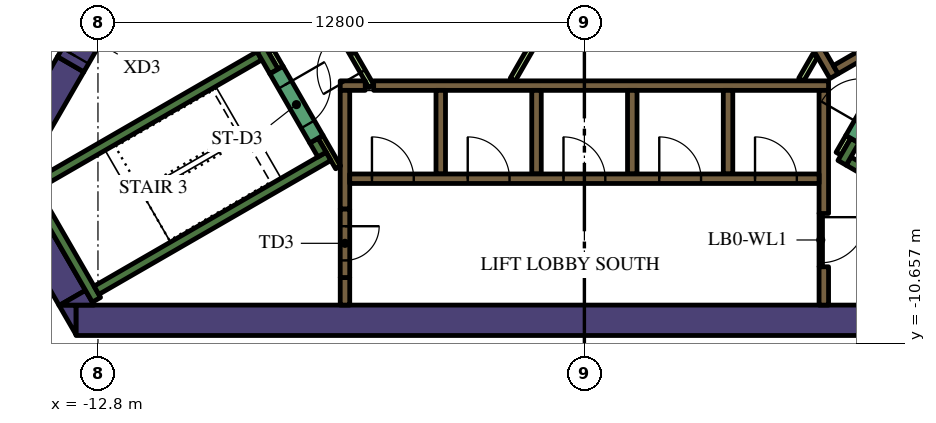
"""IFC4 building model, lengths in metres.
Left out: names, types, materials, properties, quantities, classifications, styles, units other than length and angle.
Written with IfcOpenShell. Run it as: python <this file> out.ifc"""

import sys

from ifc_helpers import new_model, si_unit, direction, frame, frame_2d, origin, place, context, subcontext, project, spatial, polyline, rectangle, outline, extrude, element, fill, save


model = new_model("IFC4")
c1 = context("Model", 3, precision=1e-05, world=origin(), true_north=direction((0.0, 1.0)))
c2 = subcontext(c1, "Body", "Model", "MODEL_VIEW")
j1 = project(units=[si_unit("LENGTHUNIT", "METRE"), si_unit("PLANEANGLEUNIT", "RADIAN")], contexts=[c1])
p1 = place(None, origin())
s1 = spatial("IfcSite", under=j1, at=p1, CompositionType="ELEMENT")
p2 = place(p1, origin())
s2 = spatial("IfcBuilding", under=s1, at=p2, CompositionType="ELEMENT")
p3 = place(p2, frame((0.0, 0.0, 162.6)))
s3 = spatial("IfcBuildingStorey", under=s2, at=p3, CompositionType="ELEMENT", Elevation=162.6)
p4 = place(p3, frame((-13.378, -10.05, 0.0), z_axis=(0.0, 0.0, 1.0), x_axis=(1.0, 0.0, 0.0)))
e1 = element("IfcWall", 1, at=p4, inside=s3, PredefinedType="SOLIDWALL", context=c2, shape_type="SweptSolid", body=[
    extrude(rectangle(XDim=22.282, YDim=0.8, at=frame_2d((11.141, 0.0))), origin(), (0.0, 0.0, 1.0), 4.2),
])
p5 = place(p3, origin())
e2 = element("IfcWall", 2, at=p5, inside=s3, PredefinedType="SOLIDWALL", context=c2, shape_type="SweptSolid", body=[
    extrude(outline(polyline([(-13.828, -9.65), (-13.38, -9.65), (-13.38, -10.426), (-13.828, -9.65)])), origin(), (0.0, 0.0, 1.0), 4.2),
])
p6 = place(p3, frame((-15.387, -6.148, 0.0), z_axis=(0.0, 0.0, 1.0), x_axis=(0.499984020225, -0.866034629516, 0.0)))
e3 = element("IfcWall", 3, at=p6, inside=s3, PredefinedType="SOLIDWALL", context=c2, shape_type="SweptSolid", body=[
    extrude(rectangle(XDim=3.824, YDim=0.8, at=frame_2d((1.912, 0.0))), origin(), (0.0, 0.0, 1.0), 4.2),
])
e4 = element("IfcWall", 4, at=p5, inside=s3, PredefinedType="SOLIDWALL", context=c2, shape_type="SweptSolid", body=[
    extrude(outline(polyline([(-12.904, -9.65), (-13.8, -9.65), (-13.128, -9.262), (-12.904, -9.65)])), origin(), (0.0, 0.0, 1.0), 4.2),
])
p7 = place(p3, frame((-13.518, -3.314, 0.0), z_axis=(0.0, 0.0, 1.0), x_axis=(-0.499969377405, -0.866043083026, 0.0)))
e5 = element("IfcWall", 5, at=p7, inside=s3, PredefinedType="SOLIDWALL", context=c2, shape_type="SweptSolid", body=[
    extrude(rectangle(XDim=2.824, YDim=0.8, at=frame_2d((1.412, 0.0))), origin(), (0.0, 0.0, 1.0), 4.2),
])
p8 = place(p3, frame((12.84, -9.261, 0.0), z_axis=(0.0, 0.0, 1.0), x_axis=(-0.866013990052, 0.500019768644, 0.0)))
e6 = element("IfcWall", 6, at=p8, inside=s3, PredefinedType="SOLIDWALL", context=c2, shape_type="SweptSolid", body=[
    extrude(rectangle(XDim=6.8, YDim=0.25, at=frame_2d((3.4, 0.0))), origin(), (0.0, 0.0, 1.0), 4.2),
])
p9 = place(p3, frame((6.78, -5.906, 0.0), z_axis=(0.0, 0.0, 1.0), x_axis=(0.500223362819, 0.865896406789, 0.0)))
e7 = element("IfcWall", 7, at=p9, inside=s3, PredefinedType="SOLIDWALL", context=c2, shape_type="SweptSolid", body=[
    extrude(rectangle(XDim=0.675, YDim=0.25, at=frame_2d((0.337, 0.0))), origin(), (0.0, 0.0, 1.0), 4.2),
])
p10 = place(p3, frame((-12.84, -9.511, 0.0), z_axis=(0.0, 0.0, 1.0), x_axis=(-0.499997733992, 0.866026712061, 0.0)))
e8 = element("IfcWall", 8, at=p10, inside=s3, PredefinedType="SOLIDWALL", context=c2, shape_type="SweptSolid", body=[
    extrude(rectangle(XDim=3.634, YDim=0.25, at=frame_2d((1.817, 0.0))), origin(), (0.0, 0.0, 1.0), 4.2),
])
p11 = place(p3, frame((-14.44, -6.49, 0.0), z_axis=(0.0, 0.0, 1.0), x_axis=(0.866022966069, 0.500004222222, 0.0)))
e9 = element("IfcWall", 9, at=p11, inside=s3, PredefinedType="SOLIDWALL", context=c2, shape_type="SweptSolid", body=[
    extrude(rectangle(XDim=6.8, YDim=0.25, at=frame_2d((3.4, 0.0))), origin(), (0.0, 0.0, 1.0), 4.2),
])
p12 = place(p3, frame((-8.168, -3.503, 0.0), z_axis=(0.0, 0.0, 1.0), x_axis=(-0.499952099219, 0.866053057547, 0.0)))
e10 = element("IfcWall", 10, at=p12, inside=s3, PredefinedType="SOLIDWALL", context=c2, shape_type="SweptSolid", body=[
    extrude(rectangle(XDim=0.675, YDim=0.25, at=frame_2d((0.337, 0.0))), origin(), (0.0, 0.0, 1.0), 4.2),
])
p13 = place(p3, frame((-12.84, -9.261, 0.0), z_axis=(0.0, 0.0, 1.0), x_axis=(0.866016039709, 0.500016218704, 0.0)))
e11 = element("IfcWall", 11, at=p13, inside=s3, PredefinedType="SOLIDWALL", context=c2, shape_type="SweptSolid", body=[
    extrude(rectangle(XDim=7.05, YDim=0.25, at=frame_2d((3.525, 0.0))), origin(), (0.0, 0.0, 1.0), 4.2),
])
p14 = place(p3, frame((-6.905, -5.69, 0.0), z_axis=(0.0, 0.0, 1.0), x_axis=(-0.500402024738, 0.865793170242, 0.0)))
e12 = element("IfcWall", 12, at=p14, inside=s3, PredefinedType="SOLIDWALL", context=c2, shape_type="SweptSolid", body=[
    extrude(rectangle(XDim=0.425, YDim=0.25, at=frame_2d((0.212, 0.0))), origin(), (0.0, 0.0, 1.0), 4.2),
])
p15 = place(p3, frame((-6.3, -8.925, 0.0), z_axis=(0.0, 0.0, 1.0), x_axis=(0.0, -1.0, 0.0)))
e13 = element("IfcWall", 13, at=p15, inside=s3, PredefinedType="SOLIDWALL", context=c2, shape_type="SweptSolid", body=[
    extrude(rectangle(XDim=0.725, YDim=0.25, at=frame_2d((0.363, 0.0))), origin(), (0.0, 0.0, 1.0), 4.2),
])
p16 = place(p3, frame((-5.545, -3.875, 0.0), z_axis=(0.0, 0.0, 1.0), x_axis=(1.0, 0.0, 0.0)))
e14 = element("IfcWall", 14, at=p16, inside=s3, PredefinedType="SOLIDWALL", context=c2, shape_type="SweptSolid", body=[
    extrude(rectangle(XDim=11.97, YDim=0.25, at=frame_2d((5.985, 0.0))), origin(), (0.0, 0.0, 1.0), 4.2),
])
p17 = place(p3, frame((-6.425, -3.875, 0.0), z_axis=(0.0, 0.0, 1.0), x_axis=(1.0, 0.0, 0.0)))
e15 = element("IfcWall", 15, at=p17, inside=s3, PredefinedType="SOLIDWALL", context=c2, shape_type="SweptSolid", body=[
    extrude(rectangle(XDim=0.658, YDim=0.25, at=frame_2d((0.329, 0.0))), origin(), (0.0, 0.0, 1.0), 4.2),
])
p18 = place(p3, frame((6.3, -7.24, 0.0), z_axis=(0.0, 0.0, 1.0), x_axis=(0.0, 1.0, 0.0)))
e16 = element("IfcWall", 16, at=p18, inside=s3, PredefinedType="SOLIDWALL", context=c2, shape_type="SweptSolid", body=[
    extrude(rectangle(XDim=3.24, YDim=0.25, at=frame_2d((1.62, 0.0))), origin(), (0.0, 0.0, 1.0), 4.2),
])
p19 = place(p3, frame((6.3, -9.65, 0.0), z_axis=(0.0, 0.0, 1.0), x_axis=(0.0, 1.0, 0.0)))
e17 = element("IfcWall", 17, at=p19, inside=s3, PredefinedType="SOLIDWALL", context=c2, shape_type="SweptSolid", body=[
    extrude(rectangle(XDim=1.008, YDim=0.25, at=frame_2d((0.504, 0.0))), origin(), (0.0, 0.0, 1.0), 4.2),
])
for number, where, z_axis, x_axis in (
    (18, (3.78, -4.0, 0.0), (0.0, 0.0, 1.0), (0.0, -1.0, 0.0)),
    (19, (1.26, -4.0, 0.0), (0.0, 0.0, 1.0), (0.0, -1.0, 0.0)),
    (20, (-1.26, -4.0, 0.0), (0.0, 0.0, 1.0), (0.0, -1.0, 0.0)),
    (21, (-3.78, -4.0, 0.0), (0.0, 0.0, 1.0), (0.0, -1.0, 0.0)),
):
    element("IfcWall", number, at=place(p3, frame(where, z_axis=z_axis, x_axis=x_axis)), inside=s3, PredefinedType="SOLIDWALL", context=c2, shape_type="SweptSolid", body=[
        extrude(rectangle(XDim=2.2, YDim=0.25, at=frame_2d((1.1, 0.0))), origin(), (0.0, 0.0, 1.0), 4.2),
    ])
p20 = place(p3, frame((-6.3, -7.125, 0.0), z_axis=(0.0, 0.0, 1.0), x_axis=(0.0, 1.0, 0.0)))
e22 = element("IfcWall", 22, at=p20, inside=s3, PredefinedType="SOLIDWALL", context=c2, shape_type="SweptSolid", body=[
    extrude(rectangle(XDim=3.125, YDim=0.25, at=frame_2d((1.562, 0.0))), origin(), (0.0, 0.0, 1.0), 4.2),
])
p21 = place(p3, frame((6.568, -3.627, 0.0), z_axis=(0.0, 0.0, 1.0), x_axis=(-0.499999455981, 0.866025717874, 0.0)))
e23 = element("IfcWall", 23, at=p21, inside=s3, PredefinedType="SOLIDWALL", context=c2, shape_type="SweptSolid", body=[
    extrude(rectangle(XDim=11.978, YDim=0.25, at=frame_2d((5.989, 0.0))), origin(), (0.0, 0.0, 1.0), 4.2),
])
p22 = place(p3, frame((6.614, -3.456, 0.0), z_axis=(0.0, 0.0, 1.0), x_axis=(0.866032512851, 0.499987686533, 0.0)))
e24 = element("IfcWall", 24, at=p22, inside=s3, PredefinedType="SOLIDWALL", context=c2, shape_type="SweptSolid", body=[
    extrude(rectangle(XDim=2.975, YDim=0.25, at=frame_2d((1.487, 0.0))), origin(), (0.0, 0.0, 1.0), 4.2),
])
p23 = place(p3, frame((-8.252, -2.958, 0.0), z_axis=(0.0, 0.0, 1.0), x_axis=(0.500174715838, -0.865924508047, 0.0)))
e25 = element("IfcWall", 25, at=p23, inside=s3, PredefinedType="PARTITIONING", context=c2, shape_type="SweptSolid", body=[
    extrude(rectangle(XDim=0.514, YDim=0.15, at=frame_2d((0.257, 0.0))), origin(), (0.0, 0.0, 1.0), 3.15),
])
p24 = place(p3, frame((-6.48, -6.027, 0.0), z_axis=(0.0, 0.0, 1.0), x_axis=(-0.499927229454, 0.866067413802, 0.0)))
e26 = element("IfcWall", 26, at=p24, inside=s3, PredefinedType="PARTITIONING", context=c2, shape_type="SweptSolid", body=[
    extrude(rectangle(XDim=0.929, YDim=0.15, at=frame_2d((0.464, 0.0))), origin(), (0.0, 0.0, 1.0), 4.2),
])
p25 = place(p3, frame((6.945, -5.222, 0.0), z_axis=(0.0, 0.0, 1.0), x_axis=(-0.499818422106, -0.866130212453, 0.0)))
e27 = element("IfcWall", 27, at=p25, inside=s3, PredefinedType="PARTITIONING", context=c2, shape_type="SweptSolid", body=[
    extrude(rectangle(XDim=0.514, YDim=0.15, at=frame_2d((0.257, 0.0))), origin(), (0.0, 0.0, 1.0), 3.15),
])
p26 = place(p3, frame((5.705, -3.718, 0.0), z_axis=(0.0, 0.0, 1.0), x_axis=(0.499962090823, 0.866047289552, 0.0)))
e28 = element("IfcWall", 28, at=p26, inside=s3, PredefinedType="PARTITIONING", context=c2, shape_type="SweptSolid", body=[
    extrude(rectangle(XDim=0.735, YDim=0.15, at=frame_2d((0.367, 0.0))), origin(), (0.0, 0.0, 1.0), 3.15),
])
p27 = place(p3, frame((-1.887, -3.718, 0.0), z_axis=(0.0, 0.0, 1.0), x_axis=(0.500043732237, 0.866000153493, 0.0)))
e29 = element("IfcWall", 29, at=p27, inside=s3, PredefinedType="PARTITIONING", context=c2, shape_type="SweptSolid", body=[
    extrude(rectangle(XDim=3.114, YDim=0.15, at=frame_2d((1.557, 0.0))), origin(), (0.0, 0.0, 1.0), 3.15),
])
p28 = place(p3, frame((-6.175, -6.325, 0.0), z_axis=(0.0, 0.0, 1.0), x_axis=(1.0, 0.0, 0.0)))
e30 = element("IfcWall", 30, at=p28, inside=s3, PredefinedType="SOLIDWALL", context=c2, shape_type="SweptSolid", body=[
    extrude(rectangle(XDim=12.35, YDim=0.25, at=frame_2d((6.175, 0.0))), origin(), (0.0, 0.0, 1.0), 4.2),
])
p29 = place(p28, frame((0.585, 0.0, 0.0)))
e31 = element("IfcOpeningElement", 31, at=p29, cuts=e30, PredefinedType="OPENING", context=c2, shape_type="SweptSolid", body=[
    extrude(rectangle(XDim=1.1, YDim=2.1, at=frame_2d((0.55, 1.05))), frame((0.0, 0.135, 0.0), z_axis=(0.0, -1.0, 0.0), x_axis=(1.0, 0.0, 0.0)), (0.0, 0.0, 1.0), 0.27),
])
p30 = place(p28, frame((3.105, 0.0, 0.0)))
e32 = element("IfcOpeningElement", 32, at=p30, cuts=e30, PredefinedType="OPENING", context=c2, shape_type="SweptSolid", body=[
    extrude(rectangle(XDim=1.1, YDim=2.1, at=frame_2d((0.55, 1.05))), frame((0.0, 0.135, 0.0), z_axis=(0.0, -1.0, 0.0), x_axis=(1.0, 0.0, 0.0)), (0.0, 0.0, 1.0), 0.27),
])
p31 = place(p28, frame((5.625, 0.0, 0.0)))
e33 = element("IfcOpeningElement", 33, at=p31, cuts=e30, PredefinedType="OPENING", context=c2, shape_type="SweptSolid", body=[
    extrude(rectangle(XDim=1.1, YDim=2.1, at=frame_2d((0.55, 1.05))), frame((0.0, 0.135, 0.0), z_axis=(0.0, -1.0, 0.0), x_axis=(1.0, 0.0, 0.0)), (0.0, 0.0, 1.0), 0.27),
])
p32 = place(p28, frame((8.145, 0.0, 0.0)))
e34 = element("IfcOpeningElement", 34, at=p32, cuts=e30, PredefinedType="OPENING", context=c2, shape_type="SweptSolid", body=[
    extrude(rectangle(XDim=1.1, YDim=2.1, at=frame_2d((0.55, 1.05))), frame((0.0, 0.135, 0.0), z_axis=(0.0, -1.0, 0.0), x_axis=(1.0, 0.0, 0.0)), (0.0, 0.0, 1.0), 0.27),
])
p33 = place(p28, frame((10.665, 0.0, 0.0)))
e35 = element("IfcOpeningElement", 35, at=p33, cuts=e30, PredefinedType="OPENING", context=c2, shape_type="SweptSolid", body=[
    extrude(rectangle(XDim=1.1, YDim=2.1, at=frame_2d((0.55, 1.05))), frame((0.0, 0.135, 0.0), z_axis=(0.0, -1.0, 0.0), x_axis=(1.0, 0.0, 0.0)), (0.0, 0.0, 1.0), 0.27),
])
p34 = place(p3, frame((7.053, -5.284, 0.0), z_axis=(0.0, 0.0, 1.0), x_axis=(0.500078061341, 0.865980330357, 0.0)))
e36 = element("IfcWall", 36, at=p34, inside=s3, PredefinedType="SOLIDWALL", context=c2, shape_type="SweptSolid", body=[
    extrude(rectangle(XDim=2.1, YDim=0.4, at=frame_2d((1.05, 0.0))), origin(), (0.0, 0.0, 1.0), 4.2),
])
p35 = place(p34, frame((0.45, 0.0, 0.0)))
e37 = element("IfcOpeningElement", 37, at=p35, cuts=e36, PredefinedType="OPENING", context=c2, shape_type="SweptSolid", body=[
    extrude(rectangle(XDim=1.2, YDim=2.1, at=frame_2d((0.6, 1.05))), frame((0.0, 0.21, 0.0), z_axis=(0.0, -1.0, 0.0), x_axis=(1.0, 0.0, 0.0)), (0.0, 0.0, 1.0), 0.42),
])
p36 = place(p3, frame((-8.103, -3.466, 0.0), z_axis=(0.0, 0.0, 1.0), x_axis=(0.500078061341, -0.865980330357, 0.0)))
e38 = element("IfcWall", 38, at=p36, inside=s3, PredefinedType="SOLIDWALL", context=c2, shape_type="SweptSolid", body=[
    extrude(rectangle(XDim=2.1, YDim=0.4, at=frame_2d((1.05, 0.0))), origin(), (0.0, 0.0, 1.0), 4.2),
])
p37 = place(p36, frame((0.45, 0.0, 0.0)))
e39 = element("IfcOpeningElement", 39, at=p37, cuts=e38, PredefinedType="OPENING", context=c2, shape_type="SweptSolid", body=[
    extrude(rectangle(XDim=1.2, YDim=2.1, at=frame_2d((0.6, 1.05))), frame((0.0, 0.21, 0.0), z_axis=(0.0, -1.0, 0.0), x_axis=(1.0, 0.0, 0.0)), (0.0, 0.0, 1.0), 0.42),
])
p38 = place(p3, frame((-6.3, -7.125, 0.0), z_axis=(0.0, 0.0, 1.0), x_axis=(0.0, -1.0, 0.0)))
e40 = element("IfcWall", 40, at=p38, inside=s3, PredefinedType="SOLIDWALL", context=c2, shape_type="SweptSolid", body=[
    extrude(rectangle(XDim=1.8, YDim=0.25, at=frame_2d((0.9, 0.0))), origin(), (0.0, 0.0, 1.0), 4.2),
])
p39 = place(p38, frame((0.45, 0.0, 0.0)))
e41 = element("IfcOpeningElement", 41, at=p39, cuts=e40, PredefinedType="OPENING", context=c2, shape_type="SweptSolid", body=[
    extrude(rectangle(XDim=0.9, YDim=2.1, at=frame_2d((0.45, 1.05))), frame((0.0, 0.135, 0.0), z_axis=(0.0, -1.0, 0.0), x_axis=(1.0, 0.0, 0.0)), (0.0, 0.0, 1.0), 0.27),
])
p40 = place(p3, frame((-5.606, -3.89, 0.0), z_axis=(0.0, 0.0, 1.0), x_axis=(-0.500027713859, 0.866009402589, 0.0)))
e42 = element("IfcWall", 42, at=p40, inside=s3, PredefinedType="PARTITIONING", context=c2, shape_type="SweptSolid", body=[
    extrude(rectangle(XDim=2.1, YDim=0.15, at=frame_2d((1.05, 0.0))), origin(), (0.0, 0.0, 1.0), 3.15),
])
p41 = place(p40, frame((0.45, 0.0, 0.0)))
e43 = element("IfcOpeningElement", 43, at=p41, cuts=e42, PredefinedType="OPENING", context=c2, shape_type="SweptSolid", body=[
    extrude(rectangle(XDim=1.2, YDim=2.1, at=frame_2d((0.6, 1.05))), frame((0.0, 0.085, 0.0), z_axis=(0.0, -1.0, 0.0), x_axis=(1.0, 0.0, 0.0)), (0.0, 0.0, 1.0), 0.17),
])
p42 = place(p3, frame((6.22, -7.237, 0.0), z_axis=(0.0, 0.0, 1.0), x_axis=(0.0, -1.0, 0.0)))
e44 = element("IfcWall", 44, at=p42, inside=s3, PredefinedType="PARTITIONING", context=c2, shape_type="SweptSolid", body=[
    extrude(rectangle(XDim=1.4, YDim=0.09, at=frame_2d((0.7, 0.0))), origin(), (0.0, 0.0, 1.0), 3.15),
])
p43 = place(p42, frame((0.1, 0.0, 0.0)))
e45 = element("IfcOpeningElement", 45, at=p43, cuts=e44, PredefinedType="OPENING", context=c2, shape_type="SweptSolid", body=[
    extrude(rectangle(XDim=1.2, YDim=2.1, at=frame_2d((0.6, 1.05))), frame((0.0, 0.055, 0.0), z_axis=(0.0, -1.0, 0.0), x_axis=(1.0, 0.0, 0.0)), (0.0, 0.0, 1.0), 0.11),
])
p44 = place(p3, frame((-13.518, -3.314, 0.0), z_axis=(0.0, 0.0, 1.0), x_axis=(0.500062241894, 0.865989465428, 0.0)))
e46 = element("IfcWall", 46, at=p44, inside=s3, PredefinedType="SOLIDWALL", context=c2, shape_type="SweptSolid", body=[
    extrude(rectangle(XDim=1.7, YDim=0.8, at=frame_2d((0.85, 0.0))), origin(), (0.0, 0.0, 1.0), 4.2),
])
p45 = place(p44, frame((0.25, 0.0, 0.0)))
e47 = element("IfcOpeningElement", 47, at=p45, cuts=e46, PredefinedType="OPENING", context=c2, shape_type="SweptSolid", body=[
    extrude(rectangle(XDim=1.2, YDim=2.1, at=frame_2d((0.6, 1.05))), frame((0.0, 0.41, 0.0), z_axis=(0.0, -1.0, 0.0), x_axis=(1.0, 0.0, 0.0)), (0.0, 0.0, 1.0), 0.82),
])
p46 = place(p3, frame((-13.047, 2.302, 0.0), z_axis=(0.0, 0.0, 1.0), x_axis=(-0.499986873641, -0.866032982159, 0.0)))
e48 = element("IfcWall", 48, at=p46, inside=s3, PredefinedType="PARTITIONING", context=c2, shape_type="SweptSolid", body=[
    extrude(rectangle(XDim=9.99, YDim=0.2, at=frame_2d((4.995, 0.0))), origin(), (0.0, 0.0, 1.0), 3.15),
])
p47 = place(p46, frame((4.5, 0.0, 0.0)))
e49 = element("IfcOpeningElement", 49, at=p47, cuts=e48, PredefinedType="OPENING", context=c2, shape_type="SweptSolid", body=[
    extrude(rectangle(XDim=1.0, YDim=2.1, at=frame_2d((0.5, 1.05))), frame((0.0, 0.11, 0.0), z_axis=(0.0, -1.0, 0.0), x_axis=(1.0, 0.0, 0.0)), (0.0, 0.0, 1.0), 0.22),
])
p48 = place(p29, origin())
e50 = element("IfcDoor", 50, at=p48, inside=s3, OperationType="DOUBLE_DOOR_SLIDING", PredefinedType="DOOR", context=c2, shape_type="SweptSolid", body=[
    extrude(rectangle(XDim=1.1, YDim=2.1, at=frame_2d((0.55, 1.05))), frame((0.0, 0.025, 0.0), z_axis=(0.0, -1.0, 0.0), x_axis=(1.0, 0.0, 0.0)), (0.0, 0.0, 1.0), 0.05),
])
fill(e31, e50)
p49 = place(p30, origin())
e51 = element("IfcDoor", 51, at=p49, inside=s3, OperationType="DOUBLE_DOOR_SLIDING", PredefinedType="DOOR", context=c2, shape_type="SweptSolid", body=[
    extrude(rectangle(XDim=1.1, YDim=2.1, at=frame_2d((0.55, 1.05))), frame((0.0, 0.025, 0.0), z_axis=(0.0, -1.0, 0.0), x_axis=(1.0, 0.0, 0.0)), (0.0, 0.0, 1.0), 0.05),
])
fill(e32, e51)
p50 = place(p31, origin())
e52 = element("IfcDoor", 52, at=p50, inside=s3, OperationType="DOUBLE_DOOR_SLIDING", PredefinedType="DOOR", context=c2, shape_type="SweptSolid", body=[
    extrude(rectangle(XDim=1.1, YDim=2.1, at=frame_2d((0.55, 1.05))), frame((0.0, 0.025, 0.0), z_axis=(0.0, -1.0, 0.0), x_axis=(1.0, 0.0, 0.0)), (0.0, 0.0, 1.0), 0.05),
])
fill(e33, e52)
p51 = place(p32, origin())
e53 = element("IfcDoor", 53, at=p51, inside=s3, OperationType="DOUBLE_DOOR_SLIDING", PredefinedType="DOOR", context=c2, shape_type="SweptSolid", body=[
    extrude(rectangle(XDim=1.1, YDim=2.1, at=frame_2d((0.55, 1.05))), frame((0.0, 0.025, 0.0), z_axis=(0.0, -1.0, 0.0), x_axis=(1.0, 0.0, 0.0)), (0.0, 0.0, 1.0), 0.05),
])
fill(e34, e53)
p52 = place(p33, origin())
e54 = element("IfcDoor", 54, at=p52, inside=s3, OperationType="DOUBLE_DOOR_SLIDING", PredefinedType="DOOR", context=c2, shape_type="SweptSolid", body=[
    extrude(rectangle(XDim=1.1, YDim=2.1, at=frame_2d((0.55, 1.05))), frame((0.0, 0.025, 0.0), z_axis=(0.0, -1.0, 0.0), x_axis=(1.0, 0.0, 0.0)), (0.0, 0.0, 1.0), 0.05),
])
fill(e35, e54)
p53 = place(p37, origin())
e55 = element("IfcDoor", 55, at=p53, inside=s3, OperationType="SINGLE_SWING_LEFT", PredefinedType="DOOR", context=c2, shape_type="SweptSolid", body=[
    extrude(rectangle(XDim=1.2, YDim=2.1, at=frame_2d((0.6, 1.05))), frame((0.0, 0.025, 0.0), z_axis=(0.0, -1.0, 0.0), x_axis=(1.0, 0.0, 0.0)), (0.0, 0.0, 1.0), 0.05),
])
fill(e39, e55)
p54 = place(p39, origin())
e56 = element("IfcDoor", 56, at=p54, inside=s3, OperationType="SINGLE_SWING_LEFT", PredefinedType="DOOR", context=c2, shape_type="SweptSolid", body=[
    extrude(rectangle(XDim=0.9, YDim=2.1, at=frame_2d((0.45, 1.05))), frame((0.0, 0.025, 0.0), z_axis=(0.0, -1.0, 0.0), x_axis=(1.0, 0.0, 0.0)), (0.0, 0.0, 1.0), 0.05),
])
fill(e41, e56)
p55 = place(p41, origin())
e57 = element("IfcDoor", 57, at=p55, inside=s3, OperationType="SINGLE_SWING_LEFT", PredefinedType="DOOR", context=c2, shape_type="SweptSolid", body=[
    extrude(rectangle(XDim=1.2, YDim=2.1, at=frame_2d((0.6, 1.05))), frame((0.0, 0.025, 0.0), z_axis=(0.0, -1.0, 0.0), x_axis=(1.0, 0.0, 0.0)), (0.0, 0.0, 1.0), 0.05),
])
fill(e43, e57)
p56 = place(p43, origin())
e58 = element("IfcDoor", 58, at=p56, inside=s3, OperationType="SINGLE_SWING_LEFT", PredefinedType="DOOR", context=c2, shape_type="SweptSolid", body=[
    extrude(rectangle(XDim=1.2, YDim=2.1, at=frame_2d((0.6, 1.05))), frame((0.0, 0.025, 0.0), z_axis=(0.0, -1.0, 0.0), x_axis=(1.0, 0.0, 0.0)), (0.0, 0.0, 1.0), 0.05),
])
fill(e45, e58)
p57 = place(p45, origin())
e59 = element("IfcDoor", 59, at=p57, inside=s3, OperationType="SINGLE_SWING_LEFT", PredefinedType="DOOR", context=c2, shape_type="SweptSolid", body=[
    extrude(rectangle(XDim=1.2, YDim=2.1, at=frame_2d((0.6, 1.05))), frame((0.0, 0.025, 0.0), z_axis=(0.0, -1.0, 0.0), x_axis=(1.0, 0.0, 0.0)), (0.0, 0.0, 1.0), 0.05),
])
fill(e47, e59)
save(model, sys.argv[1])
